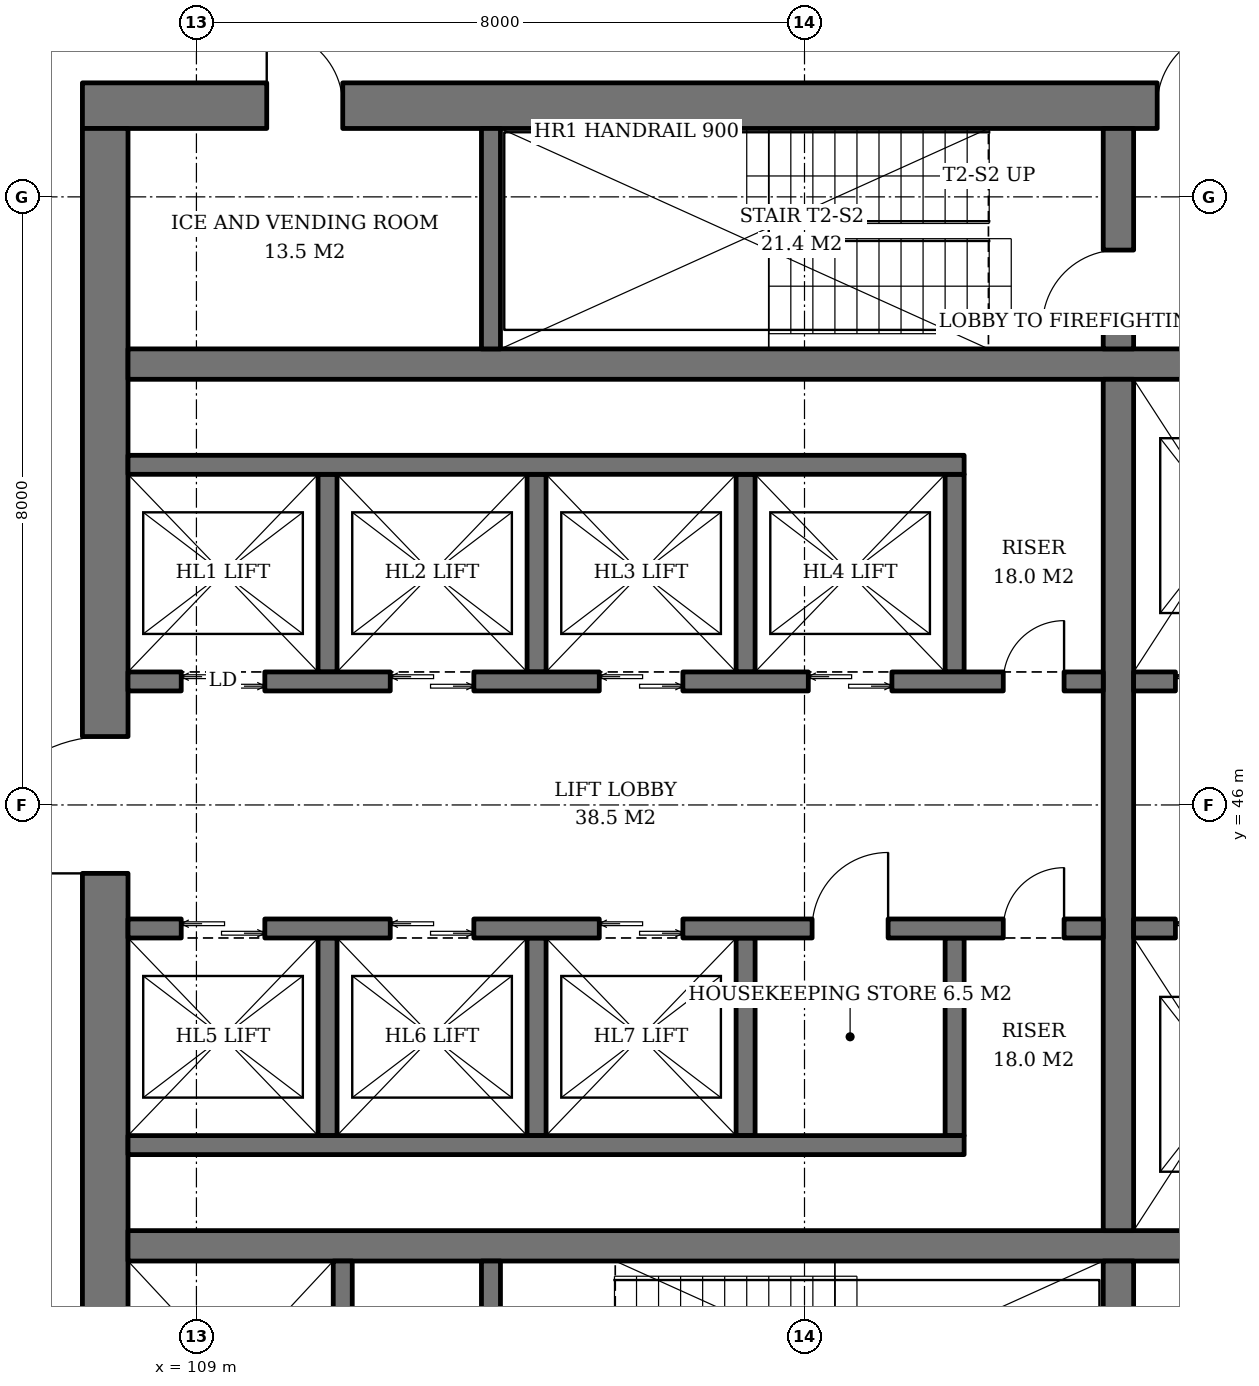
"""IFC4 building model, lengths in metres.
Left out: names, types, materials, properties, quantities, classifications, styles, units other than length and angle.
Written with IfcOpenShell. Run it as: python <this file> out.ifc"""

import sys

from ifc_helpers import new_model, si_unit, direction, frame, frame_2d, origin, place, context, subcontext, project, spatial, rectangle, extrude, element, fill, save


model = new_model("IFC4")
c1 = context("Model", 3, precision=1e-05, world=origin(), true_north=direction((0.0, 1.0)))
c2 = subcontext(c1, "Body", "Model", "MODEL_VIEW")
j1 = project(units=[si_unit("LENGTHUNIT", "METRE"), si_unit("PLANEANGLEUNIT", "RADIAN")], contexts=[c1])
p1 = place(None, origin())
s1 = spatial("IfcSite", under=j1, at=p1, CompositionType="ELEMENT")
p2 = place(p1, origin())
s2 = spatial("IfcBuilding", under=s1, at=p2, CompositionType="ELEMENT")
p3 = place(p2, frame((0.0, 0.0, 43.8)))
s3 = spatial("IfcBuildingStorey", under=s2, at=p3, CompositionType="ELEMENT", Elevation=43.8)
p4 = place(p3, frame((107.5, 55.2, 0.0), z_axis=(0.0, 0.0, 1.0), x_axis=(1.0, 0.0, 0.0)))
e1 = element("IfcWall", 1, at=p4, inside=s3, PredefinedType="SHEAR", context=c2, shape_type="SweptSolid", body=[
    extrude(rectangle(XDim=19.0, YDim=0.6, at=frame_2d((9.5, 0.0))), origin(), (0.0, 0.0, 1.0), 3.8),
])
p5 = place(p4, frame((14.14, 0.0, 0.0)))
e2 = element("IfcOpeningElement", 2, at=p5, cuts=e1, PredefinedType="OPENING", context=c2, shape_type="SweptSolid", body=[
    extrude(rectangle(XDim=1.0, YDim=2.1, at=frame_2d((0.5, 1.05))), frame((0.0, 0.31, 0.0), z_axis=(0.0, -1.0, 0.0), x_axis=(1.0, 0.0, 0.0)), (0.0, 0.0, 1.0), 0.62),
])
p6 = place(p4, frame((2.425, 0.0, 0.0)))
e3 = element("IfcOpeningElement", 3, at=p6, cuts=e1, PredefinedType="OPENING", context=c2, shape_type="SweptSolid", body=[
    extrude(rectangle(XDim=1.0, YDim=2.1, at=frame_2d((0.5, 1.05))), frame((0.0, 0.31, 0.0), z_axis=(0.0, -1.0, 0.0), x_axis=(1.0, 0.0, 0.0)), (0.0, 0.0, 1.0), 0.62),
])
p7 = place(p3, frame((107.8, 37.1, 0.0), z_axis=(0.0, 0.0, 1.0), x_axis=(0.0, 1.0, 0.0)))
e4 = element("IfcWall", 4, at=p7, inside=s3, PredefinedType="SHEAR", context=c2, shape_type="SweptSolid", body=[
    extrude(rectangle(XDim=17.8, YDim=0.6, at=frame_2d((8.9, 0.0))), origin(), (0.0, 0.0, 1.0), 3.8),
])
p8 = place(p7, frame((8.0, 0.0, 0.0)))
e5 = element("IfcOpeningElement", 5, at=p8, cuts=e4, PredefinedType="OPENING", context=c2, shape_type="SweptSolid", body=[
    extrude(rectangle(XDim=1.8, YDim=2.4, at=frame_2d((0.9, 1.2))), frame((0.0, 0.31, 0.0), z_axis=(0.0, -1.0, 0.0), x_axis=(1.0, 0.0, 0.0)), (0.0, 0.0, 1.0), 0.62),
])
for number, where, z_axis, x_axis in (
    (6, (108.1, 40.2, 0.0), (0.0, 0.0, 1.0), (1.0, 0.0, 0.0)),
    (7, (108.1, 51.8, 0.0), (0.0, 0.0, 1.0), (1.0, 0.0, 0.0)),
):
    element("IfcWall", number, at=place(p3, frame(where, z_axis=z_axis, x_axis=x_axis)), inside=s3, PredefinedType="SHEAR", context=c2, shape_type="SweptSolid", body=[
        extrude(rectangle(XDim=17.8, YDim=0.4, at=frame_2d((8.9, 0.0))), origin(), (0.0, 0.0, 1.0), 3.8),
    ])
p9 = place(p3, frame((121.13, 37.1, 0.0), z_axis=(0.0, 0.0, 1.0), x_axis=(0.0, 1.0, 0.0)))
e8 = element("IfcWall", 8, at=p9, inside=s3, PredefinedType="SHEAR", context=c2, shape_type="SweptSolid", body=[
    extrude(rectangle(XDim=2.9, YDim=0.4, at=frame_2d((1.45, 0.0))), origin(), (0.0, 0.0, 1.0), 3.8),
])
p10 = place(p3, frame((121.13, 40.4, 0.0), z_axis=(0.0, 0.0, 1.0), x_axis=(0.0, 1.0, 0.0)))
e9 = element("IfcWall", 9, at=p10, inside=s3, PredefinedType="SHEAR", context=c2, shape_type="SweptSolid", body=[
    extrude(rectangle(XDim=11.2, YDim=0.4, at=frame_2d((5.6, 0.0))), origin(), (0.0, 0.0, 1.0), 3.8),
])
p11 = place(p3, frame((121.13, 52.0, 0.0), z_axis=(0.0, 0.0, 1.0), x_axis=(0.0, 1.0, 0.0)))
e10 = element("IfcWall", 10, at=p11, inside=s3, PredefinedType="SHEAR", context=c2, shape_type="SweptSolid", body=[
    extrude(rectangle(XDim=2.9, YDim=0.4, at=frame_2d((1.45, 0.0))), origin(), (0.0, 0.0, 1.0), 3.8),
])
p12 = place(p11, frame((0.3, 0.0, 0.0)))
e11 = element("IfcOpeningElement", 11, at=p12, cuts=e10, PredefinedType="OPENING", context=c2, shape_type="SweptSolid", body=[
    extrude(rectangle(XDim=1.0, YDim=2.1, at=frame_2d((0.5, 1.05))), frame((0.0, 0.21, 0.0), z_axis=(0.0, -1.0, 0.0), x_axis=(1.0, 0.0, 0.0)), (0.0, 0.0, 1.0), 0.42),
])
p13 = place(p3, frame((110.925, 37.1, 0.0), z_axis=(0.0, 0.0, 1.0), x_axis=(0.0, 1.0, 0.0)))
e12 = element("IfcWall", 12, at=p13, inside=s3, PredefinedType="SHEAR", context=c2, shape_type="SweptSolid", body=[
    extrude(rectangle(XDim=2.9, YDim=0.25, at=frame_2d((1.45, 0.0))), origin(), (0.0, 0.0, 1.0), 3.8),
])
p14 = place(p13, frame((0.8, 0.0, 0.0)))
e13 = element("IfcOpeningElement", 13, at=p14, cuts=e12, PredefinedType="OPENING", context=c2, shape_type="SweptSolid", body=[
    extrude(rectangle(XDim=1.3, YDim=2.2, at=frame_2d((0.65, 1.1))), frame((0.0, 0.135, 0.0), z_axis=(0.0, -1.0, 0.0), x_axis=(1.0, 0.0, 0.0)), (0.0, 0.0, 1.0), 0.27),
])
p15 = place(p3, frame((112.875, 37.1, 0.0), z_axis=(0.0, 0.0, 1.0), x_axis=(0.0, 1.0, 0.0)))
e14 = element("IfcWall", 14, at=p15, inside=s3, PredefinedType="SHEAR", context=c2, shape_type="SweptSolid", body=[
    extrude(rectangle(XDim=2.9, YDim=0.25, at=frame_2d((1.45, 0.0))), origin(), (0.0, 0.0, 1.0), 3.8),
])
p16 = place(p15, frame((0.75, 0.0, 0.0)))
e15 = element("IfcOpeningElement", 15, at=p16, cuts=e14, PredefinedType="OPENING", context=c2, shape_type="SweptSolid", body=[
    extrude(rectangle(XDim=1.2, YDim=2.1, at=frame_2d((0.6, 1.05))), frame((0.0, 0.135, 0.0), z_axis=(0.0, -1.0, 0.0), x_axis=(1.0, 0.0, 0.0)), (0.0, 0.0, 1.0), 0.27),
])
p17 = place(p3, frame((112.875, 52.0, 0.0), z_axis=(0.0, 0.0, 1.0), x_axis=(0.0, 1.0, 0.0)))
e16 = element("IfcWall", 16, at=p17, inside=s3, PredefinedType="SHEAR", context=c2, shape_type="SweptSolid", body=[
    extrude(rectangle(XDim=2.9, YDim=0.25, at=frame_2d((1.45, 0.0))), origin(), (0.0, 0.0, 1.0), 3.8),
])
for number, where, z_axis, x_axis in (
    (17, (110.725, 47.75, 0.0), (0.0, 0.0, 1.0), (0.0, 1.0, 0.0)),
    (18, (113.475, 47.75, 0.0), (0.0, 0.0, 1.0), (0.0, 1.0, 0.0)),
    (19, (116.225, 47.75, 0.0), (0.0, 0.0, 1.0), (0.0, 1.0, 0.0)),
    (20, (118.975, 47.75, 0.0), (0.0, 0.0, 1.0), (0.0, 1.0, 0.0)),
):
    element("IfcWall", number, at=place(p3, frame(where, z_axis=z_axis, x_axis=x_axis)), inside=s3, PredefinedType="SHEAR", context=c2, shape_type="SweptSolid", body=[
        extrude(rectangle(XDim=2.6, YDim=0.25, at=frame_2d((1.3, 0.0))), origin(), (0.0, 0.0, 1.0), 3.8),
    ])
p18 = place(p3, frame((108.1, 50.475, 0.0), z_axis=(0.0, 0.0, 1.0), x_axis=(1.0, 0.0, 0.0)))
e21 = element("IfcWall", 21, at=p18, inside=s3, PredefinedType="SHEAR", context=c2, shape_type="SweptSolid", body=[
    extrude(rectangle(XDim=11.0, YDim=0.25, at=frame_2d((5.5, 0.0))), origin(), (0.0, 0.0, 1.0), 3.8),
])
p19 = place(p3, frame((108.1, 47.625, 0.0), z_axis=(0.0, 0.0, 1.0), x_axis=(1.0, 0.0, 0.0)))
e22 = element("IfcWall", 22, at=p19, inside=s3, PredefinedType="SHEAR", context=c2, shape_type="SweptSolid", body=[
    extrude(rectangle(XDim=12.83, YDim=0.25, at=frame_2d((6.415, 0.0))), origin(), (0.0, 0.0, 1.0), 3.8),
])
p20 = place(p19, frame((0.7, 0.0, 0.0)))
e23 = element("IfcOpeningElement", 23, at=p20, cuts=e22, PredefinedType="OPENING", context=c2, shape_type="SweptSolid", body=[
    extrude(rectangle(XDim=1.1, YDim=2.2, at=frame_2d((0.55, 1.1))), frame((0.0, 0.135, 0.0), z_axis=(0.0, -1.0, 0.0), x_axis=(1.0, 0.0, 0.0)), (0.0, 0.0, 1.0), 0.27),
])
p21 = place(p19, frame((3.45, 0.0, 0.0)))
e24 = element("IfcOpeningElement", 24, at=p21, cuts=e22, PredefinedType="OPENING", context=c2, shape_type="SweptSolid", body=[
    extrude(rectangle(XDim=1.1, YDim=2.2, at=frame_2d((0.55, 1.1))), frame((0.0, 0.135, 0.0), z_axis=(0.0, -1.0, 0.0), x_axis=(1.0, 0.0, 0.0)), (0.0, 0.0, 1.0), 0.27),
])
p22 = place(p19, frame((6.2, 0.0, 0.0)))
e25 = element("IfcOpeningElement", 25, at=p22, cuts=e22, PredefinedType="OPENING", context=c2, shape_type="SweptSolid", body=[
    extrude(rectangle(XDim=1.1, YDim=2.2, at=frame_2d((0.55, 1.1))), frame((0.0, 0.135, 0.0), z_axis=(0.0, -1.0, 0.0), x_axis=(1.0, 0.0, 0.0)), (0.0, 0.0, 1.0), 0.27),
])
p23 = place(p19, frame((8.95, 0.0, 0.0)))
e26 = element("IfcOpeningElement", 26, at=p23, cuts=e22, PredefinedType="OPENING", context=c2, shape_type="SweptSolid", body=[
    extrude(rectangle(XDim=1.1, YDim=2.2, at=frame_2d((0.55, 1.1))), frame((0.0, 0.135, 0.0), z_axis=(0.0, -1.0, 0.0), x_axis=(1.0, 0.0, 0.0)), (0.0, 0.0, 1.0), 0.27),
])
p24 = place(p19, frame((11.515, 0.0, 0.0)))
e27 = element("IfcOpeningElement", 27, at=p24, cuts=e22, PredefinedType="OPENING", context=c2, shape_type="SweptSolid", body=[
    extrude(rectangle(XDim=0.8, YDim=2.0, at=frame_2d((0.4, 1.0))), frame((0.0, 0.135, 0.0), z_axis=(0.0, -1.0, 0.0), x_axis=(1.0, 0.0, 0.0)), (0.0, 0.0, 1.0), 0.27),
])
for number, where, z_axis, x_axis in (
    (28, (110.725, 44.25, 0.0), (0.0, 0.0, 1.0), (0.0, -1.0, 0.0)),
    (29, (113.475, 44.25, 0.0), (0.0, 0.0, 1.0), (0.0, -1.0, 0.0)),
    (30, (116.225, 44.25, 0.0), (0.0, 0.0, 1.0), (0.0, -1.0, 0.0)),
    (31, (118.975, 44.25, 0.0), (0.0, 0.0, 1.0), (0.0, -1.0, 0.0)),
):
    element("IfcWall", number, at=place(p3, frame(where, z_axis=z_axis, x_axis=x_axis)), inside=s3, PredefinedType="SHEAR", context=c2, shape_type="SweptSolid", body=[
        extrude(rectangle(XDim=2.6, YDim=0.25, at=frame_2d((1.3, 0.0))), origin(), (0.0, 0.0, 1.0), 3.8),
    ])
p25 = place(p3, frame((108.1, 41.525, 0.0), z_axis=(0.0, 0.0, 1.0), x_axis=(1.0, 0.0, 0.0)))
e32 = element("IfcWall", 32, at=p25, inside=s3, PredefinedType="SHEAR", context=c2, shape_type="SweptSolid", body=[
    extrude(rectangle(XDim=11.0, YDim=0.25, at=frame_2d((5.5, 0.0))), origin(), (0.0, 0.0, 1.0), 3.8),
])
p26 = place(p3, frame((108.1, 44.375, 0.0), z_axis=(0.0, 0.0, 1.0), x_axis=(1.0, 0.0, 0.0)))
e33 = element("IfcWall", 33, at=p26, inside=s3, PredefinedType="SHEAR", context=c2, shape_type="SweptSolid", body=[
    extrude(rectangle(XDim=12.83, YDim=0.25, at=frame_2d((6.415, 0.0))), origin(), (0.0, 0.0, 1.0), 3.8),
])
p27 = place(p26, frame((0.7, 0.0, 0.0)))
e34 = element("IfcOpeningElement", 34, at=p27, cuts=e33, PredefinedType="OPENING", context=c2, shape_type="SweptSolid", body=[
    extrude(rectangle(XDim=1.1, YDim=2.2, at=frame_2d((0.55, 1.1))), frame((0.0, 0.135, 0.0), z_axis=(0.0, -1.0, 0.0), x_axis=(1.0, 0.0, 0.0)), (0.0, 0.0, 1.0), 0.27),
])
p28 = place(p26, frame((3.45, 0.0, 0.0)))
e35 = element("IfcOpeningElement", 35, at=p28, cuts=e33, PredefinedType="OPENING", context=c2, shape_type="SweptSolid", body=[
    extrude(rectangle(XDim=1.1, YDim=2.2, at=frame_2d((0.55, 1.1))), frame((0.0, 0.135, 0.0), z_axis=(0.0, -1.0, 0.0), x_axis=(1.0, 0.0, 0.0)), (0.0, 0.0, 1.0), 0.27),
])
p29 = place(p26, frame((6.2, 0.0, 0.0)))
e36 = element("IfcOpeningElement", 36, at=p29, cuts=e33, PredefinedType="OPENING", context=c2, shape_type="SweptSolid", body=[
    extrude(rectangle(XDim=1.1, YDim=2.2, at=frame_2d((0.55, 1.1))), frame((0.0, 0.135, 0.0), z_axis=(0.0, -1.0, 0.0), x_axis=(1.0, 0.0, 0.0)), (0.0, 0.0, 1.0), 0.27),
])
p30 = place(p26, frame((9.0, 0.0, 0.0)))
e37 = element("IfcOpeningElement", 37, at=p30, cuts=e33, PredefinedType="OPENING", context=c2, shape_type="SweptSolid", body=[
    extrude(rectangle(XDim=1.0, YDim=2.1, at=frame_2d((0.5, 1.05))), frame((0.0, 0.135, 0.0), z_axis=(0.0, -1.0, 0.0), x_axis=(1.0, 0.0, 0.0)), (0.0, 0.0, 1.0), 0.27),
])
p31 = place(p26, frame((11.515, 0.0, 0.0)))
e38 = element("IfcOpeningElement", 38, at=p31, cuts=e33, PredefinedType="OPENING", context=c2, shape_type="SweptSolid", body=[
    extrude(rectangle(XDim=0.8, YDim=2.0, at=frame_2d((0.4, 1.0))), frame((0.0, 0.135, 0.0), z_axis=(0.0, -1.0, 0.0), x_axis=(1.0, 0.0, 0.0)), (0.0, 0.0, 1.0), 0.27),
])
p32 = place(p3, frame((121.33, 47.625, 0.0), z_axis=(0.0, 0.0, 1.0), x_axis=(1.0, 0.0, 0.0)))
e39 = element("IfcWall", 39, at=p32, inside=s3, PredefinedType="SHEAR", context=c2, shape_type="SweptSolid", body=[
    extrude(rectangle(XDim=4.57, YDim=0.25, at=frame_2d((2.285, 0.0))), origin(), (0.0, 0.0, 1.0), 3.8),
])
p33 = place(p32, frame((0.55, 0.0, 0.0)))
e40 = element("IfcOpeningElement", 40, at=p33, cuts=e39, PredefinedType="OPENING", context=c2, shape_type="SweptSolid", body=[
    extrude(rectangle(XDim=1.4, YDim=2.4, at=frame_2d((0.7, 1.2))), frame((0.0, 0.135, 0.0), z_axis=(0.0, -1.0, 0.0), x_axis=(1.0, 0.0, 0.0)), (0.0, 0.0, 1.0), 0.27),
])
p34 = place(p32, frame((3.26, 0.0, 0.0)))
e41 = element("IfcOpeningElement", 41, at=p34, cuts=e39, PredefinedType="OPENING", context=c2, shape_type="SweptSolid", body=[
    extrude(rectangle(XDim=0.8, YDim=2.0, at=frame_2d((0.4, 1.0))), frame((0.0, 0.135, 0.0), z_axis=(0.0, -1.0, 0.0), x_axis=(1.0, 0.0, 0.0)), (0.0, 0.0, 1.0), 0.27),
])
p35 = place(p3, frame((121.33, 44.375, 0.0), z_axis=(0.0, 0.0, 1.0), x_axis=(1.0, 0.0, 0.0)))
e42 = element("IfcWall", 42, at=p35, inside=s3, PredefinedType="SHEAR", context=c2, shape_type="SweptSolid", body=[
    extrude(rectangle(XDim=4.57, YDim=0.25, at=frame_2d((2.285, 0.0))), origin(), (0.0, 0.0, 1.0), 3.8),
])
p36 = place(p35, frame((0.55, 0.0, 0.0)))
e43 = element("IfcOpeningElement", 43, at=p36, cuts=e42, PredefinedType="OPENING", context=c2, shape_type="SweptSolid", body=[
    extrude(rectangle(XDim=1.4, YDim=2.4, at=frame_2d((0.7, 1.2))), frame((0.0, 0.135, 0.0), z_axis=(0.0, -1.0, 0.0), x_axis=(1.0, 0.0, 0.0)), (0.0, 0.0, 1.0), 0.27),
])
p37 = place(p35, frame((3.26, 0.0, 0.0)))
e44 = element("IfcOpeningElement", 44, at=p37, cuts=e42, PredefinedType="OPENING", context=c2, shape_type="SweptSolid", body=[
    extrude(rectangle(XDim=0.8, YDim=2.0, at=frame_2d((0.4, 1.0))), frame((0.0, 0.135, 0.0), z_axis=(0.0, -1.0, 0.0), x_axis=(1.0, 0.0, 0.0)), (0.0, 0.0, 1.0), 0.27),
])
p38 = place(p20, origin())
e45 = element("IfcDoor", 45, at=p38, inside=s3, OperationType="DOUBLE_DOOR_SLIDING", PredefinedType="DOOR", context=c2, shape_type="SweptSolid", body=[
    extrude(rectangle(XDim=1.1, YDim=2.2, at=frame_2d((0.55, 1.1))), frame((0.0, 0.025, 0.0), z_axis=(0.0, -1.0, 0.0), x_axis=(1.0, 0.0, 0.0)), (0.0, 0.0, 1.0), 0.05),
])
fill(e23, e45)
p39 = place(p21, origin())
e46 = element("IfcDoor", 46, at=p39, inside=s3, OperationType="DOUBLE_DOOR_SLIDING", PredefinedType="DOOR", context=c2, shape_type="SweptSolid", body=[
    extrude(rectangle(XDim=1.1, YDim=2.2, at=frame_2d((0.55, 1.1))), frame((0.0, 0.025, 0.0), z_axis=(0.0, -1.0, 0.0), x_axis=(1.0, 0.0, 0.0)), (0.0, 0.0, 1.0), 0.05),
])
fill(e24, e46)
p40 = place(p22, origin())
e47 = element("IfcDoor", 47, at=p40, inside=s3, OperationType="DOUBLE_DOOR_SLIDING", PredefinedType="DOOR", context=c2, shape_type="SweptSolid", body=[
    extrude(rectangle(XDim=1.1, YDim=2.2, at=frame_2d((0.55, 1.1))), frame((0.0, 0.025, 0.0), z_axis=(0.0, -1.0, 0.0), x_axis=(1.0, 0.0, 0.0)), (0.0, 0.0, 1.0), 0.05),
])
fill(e25, e47)
p41 = place(p23, origin())
e48 = element("IfcDoor", 48, at=p41, inside=s3, OperationType="DOUBLE_DOOR_SLIDING", PredefinedType="DOOR", context=c2, shape_type="SweptSolid", body=[
    extrude(rectangle(XDim=1.1, YDim=2.2, at=frame_2d((0.55, 1.1))), frame((0.0, 0.025, 0.0), z_axis=(0.0, -1.0, 0.0), x_axis=(1.0, 0.0, 0.0)), (0.0, 0.0, 1.0), 0.05),
])
fill(e26, e48)
p42 = place(p24, origin())
e49 = element("IfcDoor", 49, at=p42, inside=s3, OperationType="SINGLE_SWING_RIGHT", PredefinedType="DOOR", context=c2, shape_type="SweptSolid", body=[
    extrude(rectangle(XDim=0.8, YDim=2.0, at=frame_2d((0.4, 1.0))), frame((0.0, 0.025, 0.0), z_axis=(0.0, -1.0, 0.0), x_axis=(1.0, 0.0, 0.0)), (0.0, 0.0, 1.0), 0.05),
])
fill(e27, e49)
p43 = place(p27, origin())
e50 = element("IfcDoor", 50, at=p43, inside=s3, OperationType="DOUBLE_DOOR_SLIDING", PredefinedType="DOOR", context=c2, shape_type="SweptSolid", body=[
    extrude(rectangle(XDim=1.1, YDim=2.2, at=frame_2d((0.55, 1.1))), frame((0.0, 0.025, 0.0), z_axis=(0.0, -1.0, 0.0), x_axis=(1.0, 0.0, 0.0)), (0.0, 0.0, 1.0), 0.05),
])
fill(e34, e50)
p44 = place(p28, origin())
e51 = element("IfcDoor", 51, at=p44, inside=s3, OperationType="DOUBLE_DOOR_SLIDING", PredefinedType="DOOR", context=c2, shape_type="SweptSolid", body=[
    extrude(rectangle(XDim=1.1, YDim=2.2, at=frame_2d((0.55, 1.1))), frame((0.0, 0.025, 0.0), z_axis=(0.0, -1.0, 0.0), x_axis=(1.0, 0.0, 0.0)), (0.0, 0.0, 1.0), 0.05),
])
fill(e35, e51)
p45 = place(p29, origin())
e52 = element("IfcDoor", 52, at=p45, inside=s3, OperationType="DOUBLE_DOOR_SLIDING", PredefinedType="DOOR", context=c2, shape_type="SweptSolid", body=[
    extrude(rectangle(XDim=1.1, YDim=2.2, at=frame_2d((0.55, 1.1))), frame((0.0, 0.025, 0.0), z_axis=(0.0, -1.0, 0.0), x_axis=(1.0, 0.0, 0.0)), (0.0, 0.0, 1.0), 0.05),
])
fill(e36, e52)
p46 = place(p30, origin())
e53 = element("IfcDoor", 53, at=p46, inside=s3, OperationType="SINGLE_SWING_RIGHT", PredefinedType="DOOR", context=c2, shape_type="SweptSolid", body=[
    extrude(rectangle(XDim=1.0, YDim=2.1, at=frame_2d((0.5, 1.05))), frame((0.0, 0.025, 0.0), z_axis=(0.0, -1.0, 0.0), x_axis=(1.0, 0.0, 0.0)), (0.0, 0.0, 1.0), 0.05),
])
fill(e37, e53)
p47 = place(p31, origin())
e54 = element("IfcDoor", 54, at=p47, inside=s3, OperationType="SINGLE_SWING_RIGHT", PredefinedType="DOOR", context=c2, shape_type="SweptSolid", body=[
    extrude(rectangle(XDim=0.8, YDim=2.0, at=frame_2d((0.4, 1.0))), frame((0.0, 0.025, 0.0), z_axis=(0.0, -1.0, 0.0), x_axis=(1.0, 0.0, 0.0)), (0.0, 0.0, 1.0), 0.05),
])
fill(e38, e54)
p48 = place(p33, origin())
e55 = element("IfcDoor", 55, at=p48, inside=s3, OperationType="DOUBLE_DOOR_SLIDING", PredefinedType="DOOR", context=c2, shape_type="SweptSolid", body=[
    extrude(rectangle(XDim=1.4, YDim=2.4, at=frame_2d((0.7, 1.2))), frame((0.0, 0.025, 0.0), z_axis=(0.0, -1.0, 0.0), x_axis=(1.0, 0.0, 0.0)), (0.0, 0.0, 1.0), 0.05),
])
fill(e40, e55)
p49 = place(p36, origin())
e56 = element("IfcDoor", 56, at=p49, inside=s3, OperationType="DOUBLE_DOOR_SLIDING", PredefinedType="DOOR", context=c2, shape_type="SweptSolid", body=[
    extrude(rectangle(XDim=1.4, YDim=2.4, at=frame_2d((0.7, 1.2))), frame((0.0, 0.025, 0.0), z_axis=(0.0, -1.0, 0.0), x_axis=(1.0, 0.0, 0.0)), (0.0, 0.0, 1.0), 0.05),
])
fill(e43, e56)
p50 = place(p12, origin())
e57 = element("IfcDoor", 57, at=p50, inside=s3, OperationType="SINGLE_SWING_LEFT", PredefinedType="DOOR", context=c2, shape_type="SweptSolid", body=[
    extrude(rectangle(XDim=1.0, YDim=2.1, at=frame_2d((0.5, 1.05))), frame((0.0, 0.025, 0.0), z_axis=(0.0, -1.0, 0.0), x_axis=(1.0, 0.0, 0.0)), (0.0, 0.0, 1.0), 0.05),
])
fill(e11, e57)
p51 = place(p5, origin())
e58 = element("IfcDoor", 58, at=p51, inside=s3, OperationType="SINGLE_SWING_RIGHT", PredefinedType="DOOR", context=c2, shape_type="SweptSolid", body=[
    extrude(rectangle(XDim=1.0, YDim=2.1, at=frame_2d((0.5, 1.05))), frame((0.0, 0.025, 0.0), z_axis=(0.0, -1.0, 0.0), x_axis=(1.0, 0.0, 0.0)), (0.0, 0.0, 1.0), 0.05),
])
fill(e2, e58)
p52 = place(p8, origin())
e59 = element("IfcDoor", 59, at=p52, inside=s3, OperationType="DOUBLE_DOOR_SINGLE_SWING", PredefinedType="DOOR", context=c2, shape_type="SweptSolid", body=[
    extrude(rectangle(XDim=1.8, YDim=2.4, at=frame_2d((0.9, 1.2))), frame((0.0, 0.025, 0.0), z_axis=(0.0, -1.0, 0.0), x_axis=(1.0, 0.0, 0.0)), (0.0, 0.0, 1.0), 0.05),
])
fill(e5, e59)
p53 = place(p6, origin())
e60 = element("IfcDoor", 60, at=p53, inside=s3, OperationType="SINGLE_SWING_LEFT", PredefinedType="DOOR", context=c2, shape_type="SweptSolid", body=[
    extrude(rectangle(XDim=1.0, YDim=2.1, at=frame_2d((0.5, 1.05))), frame((0.0, -0.24, 0.0), z_axis=(0.0, -1.0, 0.0), x_axis=(1.0, 0.0, 0.0)), (0.0, 0.0, 1.0), 0.05),
])
fill(e3, e60)
save(model, sys.argv[1])
